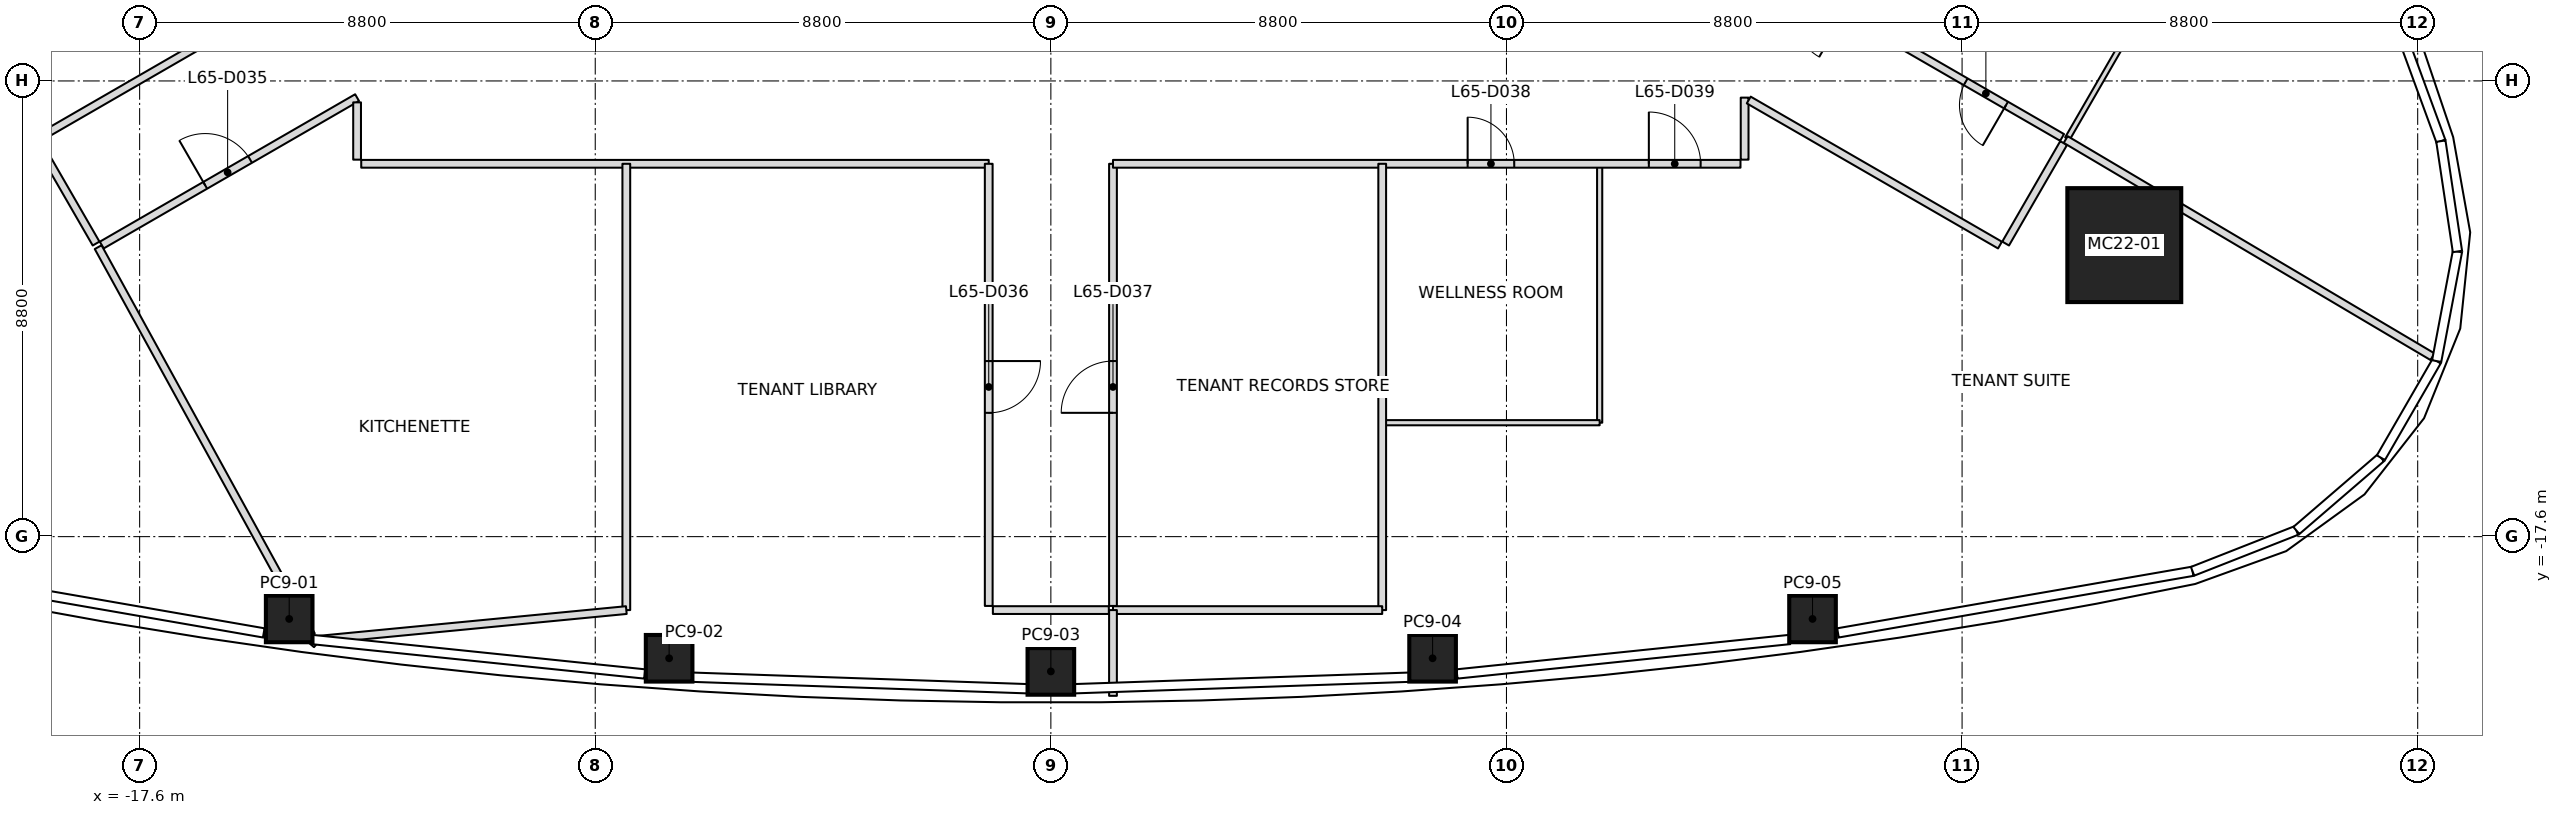
"""IFC4 building model, lengths in metres.
Left out: names, types, materials, properties, quantities, classifications, styles, units other than length and angle.
Written with IfcOpenShell. Run it as: python <this file> out.ifc"""

import sys

from ifc_helpers import new_model, si_unit, direction, frame, frame_2d, origin, origin_2d, place, context, subcontext, project, spatial, rectangle, extrude, element, fill, save


model = new_model("IFC4")
c1 = context("Model", 3, precision=1e-05, world=origin(), true_north=direction((0.0, 1.0)))
c2 = subcontext(c1, "Body", "Model", "MODEL_VIEW")
j1 = project(units=[si_unit("LENGTHUNIT", "METRE"), si_unit("PLANEANGLEUNIT", "RADIAN")], contexts=[c1])
p1 = place(None, origin())
s1 = spatial("IfcSite", under=j1, at=p1, CompositionType="ELEMENT")
p2 = place(p1, origin())
s2 = spatial("IfcBuilding", under=s1, at=p2, CompositionType="ELEMENT")
p3 = place(p2, frame((0.0, 0.0, 287.0)))
s3 = spatial("IfcBuildingStorey", under=s2, at=p3, CompositionType="ELEMENT", Elevation=287.0)
p4 = place(p3, frame((20.733, -11.97, 0.0), z_axis=(-0.027756747396, 0.015983006193, 0.999486921619), x_axis=(0.999614707262, 0.000443807261, 0.027753199115)))
e1 = element("IfcColumn", 1, at=p4, inside=s3, PredefinedType="COLUMN", context=c2, shape_type="SweptSolid", body=[
    extrude(rectangle(XDim=2.2, YDim=2.2, at=origin_2d()), origin(), (0.0, 0.0, 1.0), 4.002),
])
p5 = place(p3, frame((-14.711, -19.189, 0.0), z_axis=(0.017452456582, 0.010373837829, 0.999793876381), x_axis=(-0.990401248392, 0.137308803417, 0.015863785428)))
e2 = element("IfcColumn", 2, at=p5, inside=s3, PredefinedType="COLUMN", context=c2, shape_type="SweptSolid", body=[
    extrude(rectangle(XDim=0.9, YDim=0.9, at=origin_2d()), origin(), (0.0, 0.0, 1.0), 4.001),
])
p6 = place(p3, frame((-7.373, -19.949, 0.0), z_axis=(0.008727150594, 0.011168311599, 0.999899547784), x_axis=(-0.997597240476, 0.068823896137, 0.007938332055)))
e3 = element("IfcColumn", 3, at=p6, inside=s3, PredefinedType="COLUMN", context=c2, shape_type="SweptSolid", body=[
    extrude(rectangle(XDim=0.9, YDim=0.9, at=origin_2d()), origin(), (0.0, 0.0, 1.0), 4.0),
])
p7 = place(p3, frame((0.0, -20.203, 0.0), z_axis=(0.0, 0.011473854038, 0.99993417317), x_axis=(1.0, 0.0, 0.0)))
e4 = element("IfcColumn", 4, at=p7, inside=s3, PredefinedType="COLUMN", context=c2, shape_type="SweptSolid", body=[
    extrude(rectangle(XDim=0.9, YDim=0.9, at=origin_2d()), origin(), (0.0, 0.0, 1.0), 4.0),
])
p8 = place(p3, frame((7.373, -19.949, 0.0), z_axis=(-0.008727150594, 0.011168311599, 0.999899547784), x_axis=(0.997597240476, 0.068823896137, 0.007938332055)))
e5 = element("IfcColumn", 5, at=p8, inside=s3, PredefinedType="COLUMN", context=c2, shape_type="SweptSolid", body=[
    extrude(rectangle(XDim=0.9, YDim=0.9, at=origin_2d()), origin(), (0.0, 0.0, 1.0), 4.0),
])
p9 = place(p3, frame((14.711, -19.189, 0.0), z_axis=(-0.017452456582, 0.010373837829, 0.999793876381), x_axis=(0.990401248392, 0.137308803417, 0.015863785428)))
e6 = element("IfcColumn", 6, at=p9, inside=s3, PredefinedType="COLUMN", context=c2, shape_type="SweptSolid", body=[
    extrude(rectangle(XDim=0.9, YDim=0.9, at=origin_2d()), origin(), (0.0, 0.0, 1.0), 4.001),
])
p10 = place(p3, frame((-18.401, -12.01, 0.0), z_axis=(0.0, 0.0, 1.0), x_axis=(0.481538391905, -0.876424998002, 0.0)))
e7 = element("IfcWall", 7, at=p10, inside=s3, PredefinedType="PARTITIONING", context=c2, shape_type="SweptSolid", body=[
    extrude(rectangle(XDim=8.551, YDim=0.15, at=frame_2d((4.275, 0.0))), origin(), (0.0, 0.0, 1.0), 3.3),
])
p11 = place(p3, frame((-8.2, -10.4, 0.0), z_axis=(0.0, 0.0, 1.0), x_axis=(0.0, -1.0, 0.0)))
e8 = element("IfcWall", 8, at=p11, inside=s3, PredefinedType="PARTITIONING", context=c2, shape_type="SweptSolid", body=[
    extrude(rectangle(XDim=8.619, YDim=0.15, at=frame_2d((4.309, 0.0))), origin(), (0.0, 0.0, 1.0), 3.3),
])
p12 = place(p3, frame((-8.2, -19.019, 0.0), z_axis=(0.0, 0.0, 1.0), x_axis=(-0.995385286617, -0.09595900784, 0.0)))
e9 = element("IfcWall", 9, at=p12, inside=s3, PredefinedType="PARTITIONING", context=c2, shape_type="SweptSolid", body=[
    extrude(rectangle(XDim=5.961, YDim=0.15, at=frame_2d((2.98, 0.0))), origin(), (0.0, 0.0, 1.0), 3.234),
])
p13 = place(p3, frame((-14.184, -19.677, 0.0), z_axis=(0.0, 0.0, 1.0), x_axis=(-0.763090850206, 0.646291230276, 0.0)))
e10 = element("IfcWall", 10, at=p13, inside=s3, PredefinedType="PARTITIONING", context=c2, shape_type="SweptSolid", body=[
    extrude(rectangle(XDim=0.188, YDim=0.15, at=frame_2d((0.094, 0.0))), origin(), (0.0, 0.0, 1.0), 3.3),
])
p14 = place(p3, frame((6.4, -10.4, 0.0), z_axis=(0.0, 0.0, 1.0), x_axis=(0.0, -1.0, 0.0)))
e11 = element("IfcWall", 11, at=p14, inside=s3, PredefinedType="PARTITIONING", context=c2, shape_type="SweptSolid", body=[
    extrude(rectangle(XDim=8.619, YDim=0.15, at=frame_2d((4.309, 0.0))), origin(), (0.0, 0.0, 1.0), 3.3),
])
p15 = place(p3, frame((6.4, -19.019, 0.0), z_axis=(0.0, 0.0, 1.0), x_axis=(-1.0, 0.0, 0.0)))
e12 = element("IfcWall", 12, at=p15, inside=s3, PredefinedType="PARTITIONING", context=c2, shape_type="SweptSolid", body=[
    extrude(rectangle(XDim=5.2, YDim=0.15, at=frame_2d((2.6, 0.0))), origin(), (0.0, 0.0, 1.0), 3.3),
])
p16 = place(p3, frame((1.2, -19.019, 0.0), z_axis=(0.0, 0.0, 1.0), x_axis=(0.0, -1.0, 0.0)))
e13 = element("IfcWall", 13, at=p16, inside=s3, PredefinedType="PARTITIONING", context=c2, shape_type="SweptSolid", body=[
    extrude(rectangle(XDim=1.656, YDim=0.15, at=frame_2d((0.828, 0.0))), origin(), (0.0, 0.0, 1.0), 3.234),
])
p17 = place(p3, frame((19.601, -9.931, 0.0), z_axis=(0.0, 0.0, 1.0), x_axis=(0.860520712643, -0.509415452369, 0.0)))
e14 = element("IfcWall", 14, at=p17, inside=s3, PredefinedType="PARTITIONING", context=c2, shape_type="SweptSolid", body=[
    extrude(rectangle(XDim=8.234, YDim=0.15, at=frame_2d((4.117, 0.0))), origin(), (0.0, 0.0, 1.0), 3.084),
])
p18 = place(p3, frame((-19.561, -10.0, 0.0), z_axis=(0.0, 0.0, 1.0), x_axis=(0.500077830873, -0.865980463445, 0.0)))
e15 = element("IfcWall", 15, at=p18, inside=s3, PredefinedType="PARTITIONING", context=c2, shape_type="SweptSolid", body=[
    extrude(rectangle(XDim=2.24, YDim=0.15, at=frame_2d((1.12, 0.0))), origin(), (0.0, 0.0, 1.0), 3.233),
])
p19 = place(p3, frame((-13.4, -6.351, 0.0), z_axis=(0.0, 0.0, 1.0), x_axis=(-0.86602998301, -0.499992068465, 0.0)))
e16 = element("IfcWall", 16, at=p19, inside=s3, PredefinedType="PARTITIONING", context=c2, shape_type="SweptSolid", body=[
    extrude(rectangle(XDim=7.081, YDim=0.15, at=frame_2d((3.54, 0.0))), origin(), (0.0, 0.0, 1.0), 3.3),
])
p20 = place(p3, frame((-18.332, -11.969, 0.0), z_axis=(0.0, 0.0, 1.0), x_axis=(0.866026383709, 0.499998302717, 0.0)))
e17 = element("IfcWall", 17, at=p20, inside=s3, PredefinedType="PARTITIONING", context=c2, shape_type="SweptSolid", body=[
    extrude(rectangle(XDim=5.695, YDim=0.15, at=frame_2d((2.847, 0.0))), origin(), (0.0, 0.0, 1.0), 3.233),
])
p21 = place(p20, frame((2.308, 0.0, 0.0)))
e18 = element("IfcOpeningElement", 18, at=p21, cuts=e17, PredefinedType="OPENING", context=c2, shape_type="SweptSolid", body=[
    extrude(rectangle(XDim=1.0, YDim=2.1, at=frame_2d((0.5, 1.05))), frame((0.0, 0.075, 0.0), z_axis=(0.0, -1.0, 0.0), x_axis=(1.0, 0.0, 0.0)), (0.0, 0.0, 1.0), 0.15),
])
p22 = place(p3, frame((-13.4, -9.214, 0.0), z_axis=(0.0, 0.0, 1.0), x_axis=(0.0, -1.0, 0.0)))
e19 = element("IfcWall", 19, at=p22, inside=s3, PredefinedType="PARTITIONING", context=c2, shape_type="SweptSolid", body=[
    extrude(rectangle(XDim=1.106, YDim=0.15, at=frame_2d((0.553, 0.0))), origin(), (0.0, 0.0, 1.0), 3.233),
])
p23 = place(p3, frame((-13.32, -10.4, 0.0), z_axis=(0.0, 0.0, 1.0), x_axis=(1.0, 0.0, 0.0)))
e20 = element("IfcWall", 20, at=p23, inside=s3, PredefinedType="PARTITIONING", context=c2, shape_type="SweptSolid", body=[
    extrude(rectangle(XDim=12.12, YDim=0.15, at=frame_2d((6.06, 0.0))), origin(), (0.0, 0.0, 1.0), 3.3),
])
p24 = place(p3, frame((-1.2, -10.4, 0.0), z_axis=(0.0, 0.0, 1.0), x_axis=(0.0, -1.0, 0.0)))
e21 = element("IfcWall", 21, at=p24, inside=s3, PredefinedType="PARTITIONING", context=c2, shape_type="SweptSolid", body=[
    extrude(rectangle(XDim=8.539, YDim=0.15, at=frame_2d((4.269, 0.0))), origin(), (0.0, 0.0, 1.0), 3.3),
])
p25 = place(p24, frame((3.809, 0.0, 0.0)))
e22 = element("IfcOpeningElement", 22, at=p25, cuts=e21, PredefinedType="OPENING", context=c2, shape_type="SweptSolid", body=[
    extrude(rectangle(XDim=1.0, YDim=2.1, at=frame_2d((0.5, 1.05))), frame((0.0, 0.075, 0.0), z_axis=(0.0, -1.0, 0.0), x_axis=(1.0, 0.0, 0.0)), (0.0, 0.0, 1.0), 0.15),
])
p26 = place(p3, frame((-1.12, -19.019, 0.0), z_axis=(0.0, 0.0, 1.0), x_axis=(1.0, 0.0, 0.0)))
e23 = element("IfcWall", 23, at=p26, inside=s3, PredefinedType="PARTITIONING", context=c2, shape_type="SweptSolid", body=[
    extrude(rectangle(XDim=2.24, YDim=0.15, at=frame_2d((1.12, 0.0))), origin(), (0.0, 0.0, 1.0), 3.3),
])
p27 = place(p3, frame((1.2, -18.938, 0.0), z_axis=(0.0, 0.0, 1.0), x_axis=(0.0, 1.0, 0.0)))
e24 = element("IfcWall", 24, at=p27, inside=s3, PredefinedType="PARTITIONING", context=c2, shape_type="SweptSolid", body=[
    extrude(rectangle(XDim=8.539, YDim=0.15, at=frame_2d((4.269, 0.0))), origin(), (0.0, 0.0, 1.0), 3.3),
])
p28 = place(p27, frame((3.729, 0.0, 0.0)))
e25 = element("IfcOpeningElement", 25, at=p28, cuts=e24, PredefinedType="OPENING", context=c2, shape_type="SweptSolid", body=[
    extrude(rectangle(XDim=1.0, YDim=2.1, at=frame_2d((0.5, 1.05))), frame((0.0, 0.075, 0.0), z_axis=(0.0, -1.0, 0.0), x_axis=(1.0, 0.0, 0.0)), (0.0, 0.0, 1.0), 0.15),
])
p29 = place(p3, frame((1.2, -10.4, 0.0), z_axis=(0.0, 0.0, 1.0), x_axis=(1.0, 0.0, 0.0)))
e26 = element("IfcWall", 26, at=p29, inside=s3, PredefinedType="PARTITIONING", context=c2, shape_type="SweptSolid", body=[
    extrude(rectangle(XDim=12.12, YDim=0.15, at=frame_2d((6.06, 0.0))), origin(), (0.0, 0.0, 1.0), 3.3),
])
p30 = place(p29, frame((6.85, 0.0, 0.0)))
e27 = element("IfcOpeningElement", 27, at=p30, cuts=e26, PredefinedType="OPENING", context=c2, shape_type="SweptSolid", body=[
    extrude(rectangle(XDim=0.9, YDim=2.1, at=frame_2d((0.45, 1.05))), frame((0.0, 0.075, 0.0), z_axis=(0.0, -1.0, 0.0), x_axis=(1.0, 0.0, 0.0)), (0.0, 0.0, 1.0), 0.15),
])
p31 = place(p29, frame((10.35, 0.0, 0.0)))
e28 = element("IfcOpeningElement", 28, at=p31, cuts=e26, PredefinedType="OPENING", context=c2, shape_type="SweptSolid", body=[
    extrude(rectangle(XDim=1.0, YDim=2.1, at=frame_2d((0.5, 1.05))), frame((0.0, 0.075, 0.0), z_axis=(0.0, -1.0, 0.0), x_axis=(1.0, 0.0, 0.0)), (0.0, 0.0, 1.0), 0.15),
])
p32 = place(p3, frame((13.4, -10.32, 0.0), z_axis=(0.0, 0.0, 1.0), x_axis=(0.0, 1.0, 0.0)))
e29 = element("IfcWall", 29, at=p32, inside=s3, PredefinedType="PARTITIONING", context=c2, shape_type="SweptSolid", body=[
    extrude(rectangle(XDim=1.198, YDim=0.15, at=frame_2d((0.599, 0.0))), origin(), (0.0, 0.0, 1.0), 3.233),
])
p33 = place(p3, frame((13.479, -9.168, 0.0), z_axis=(0.0, 0.0, 1.0), x_axis=(0.866033213741, -0.499986472514, 0.0)))
e30 = element("IfcWall", 30, at=p33, inside=s3, PredefinedType="PARTITIONING", context=c2, shape_type="SweptSolid", body=[
    extrude(rectangle(XDim=5.603, YDim=0.15, at=frame_2d((2.802, 0.0))), origin(), (0.0, 0.0, 1.0), 3.233),
])
p34 = place(p3, frame((19.532, -9.891, 0.0), z_axis=(0.0, 0.0, 1.0), x_axis=(-0.86602998301, 0.499992068465, 0.0)))
e31 = element("IfcWall", 31, at=p34, inside=s3, PredefinedType="PARTITIONING", context=c2, shape_type="SweptSolid", body=[
    extrude(rectangle(XDim=7.081, YDim=0.15, at=frame_2d((3.54, 0.0))), origin(), (0.0, 0.0, 1.0), 3.167),
])
p35 = place(p34, frame((1.25, 0.0, 0.0)))
e32 = element("IfcOpeningElement", 32, at=p35, cuts=e31, PredefinedType="OPENING", context=c2, shape_type="SweptSolid", body=[
    extrude(rectangle(XDim=0.9, YDim=2.1, at=frame_2d((0.45, 1.05))), frame((0.0, 0.075, 0.0), z_axis=(0.0, -1.0, 0.0), x_axis=(1.0, 0.0, 0.0)), (0.0, 0.0, 1.0), 0.15),
])
p36 = place(p34, frame((4.84, 0.0, 0.0)))
e33 = element("IfcOpeningElement", 33, at=p36, cuts=e31, PredefinedType="OPENING", context=c2, shape_type="SweptSolid", body=[
    extrude(rectangle(XDim=1.0, YDim=2.1, at=frame_2d((0.5, 1.05))), frame((0.0, 0.075, 0.0), z_axis=(0.0, -1.0, 0.0), x_axis=(1.0, 0.0, 0.0)), (0.0, 0.0, 1.0), 0.15),
])
p37 = place(p3, frame((18.441, -11.94, 0.0), z_axis=(0.0, 0.0, 1.0), x_axis=(0.500077830873, 0.865980463445, 0.0)))
e34 = element("IfcWall", 34, at=p37, inside=s3, PredefinedType="PARTITIONING", context=c2, shape_type="SweptSolid", body=[
    extrude(rectangle(XDim=2.24, YDim=0.15, at=frame_2d((1.12, 0.0))), origin(), (0.0, 0.0, 1.0), 3.233),
])
p38 = place(p3, frame((10.6, -10.43, 0.0), z_axis=(0.0, 0.0, 1.0), x_axis=(0.0, -1.0, 0.0)))
e35 = element("IfcWall", 35, at=p38, inside=s3, PredefinedType="PARTITIONING", context=c2, shape_type="SweptSolid", body=[
    extrude(rectangle(XDim=4.97, YDim=0.1, at=frame_2d((2.485, 0.0))), origin(), (0.0, 0.0, 1.0), 3.3),
])
p39 = place(p3, frame((10.6, -15.4, 0.0), z_axis=(0.0, 0.0, 1.0), x_axis=(-1.0, 0.0, 0.0)))
e36 = element("IfcWall", 36, at=p39, inside=s3, PredefinedType="PARTITIONING", context=c2, shape_type="SweptSolid", body=[
    extrude(rectangle(XDim=4.17, YDim=0.1, at=frame_2d((2.085, 0.0))), origin(), (0.0, 0.0, 1.0), 3.3),
])
p40 = place(p3, frame((21.719, -6.304, 0.0), z_axis=(0.0, 0.0, 1.0), x_axis=(-0.499992746786, -0.866029591389, 0.0)))
e37 = element("IfcWall", 37, at=p40, inside=s3, PredefinedType="PARTITIONING", context=c2, shape_type="SweptSolid", body=[
    extrude(rectangle(XDim=4.17, YDim=0.1, at=frame_2d((2.085, 0.0))), origin(), (0.0, 0.0, 1.0), 3.3),
])
p41 = place(p21, origin())
e38 = element("IfcDoor", 38, at=p41, inside=s3, OperationType="SINGLE_SWING_LEFT", PredefinedType="DOOR", context=c2, shape_type="SweptSolid", body=[
    extrude(rectangle(XDim=1.0, YDim=2.1, at=frame_2d((0.5, 1.05))), frame((0.0, 0.025, 0.0), z_axis=(0.0, -1.0, 0.0), x_axis=(1.0, 0.0, 0.0)), (0.0, 0.0, 1.0), 0.05),
])
fill(e18, e38)
p42 = place(p25, origin())
e39 = element("IfcDoor", 39, at=p42, inside=s3, OperationType="SINGLE_SWING_RIGHT", PredefinedType="DOOR", context=c2, shape_type="SweptSolid", body=[
    extrude(rectangle(XDim=1.0, YDim=2.1, at=frame_2d((0.5, 1.05))), frame((0.0, 0.025, 0.0), z_axis=(0.0, -1.0, 0.0), x_axis=(1.0, 0.0, 0.0)), (0.0, 0.0, 1.0), 0.05),
])
fill(e22, e39)
p43 = place(p28, origin())
e40 = element("IfcDoor", 40, at=p43, inside=s3, OperationType="SINGLE_SWING_LEFT", PredefinedType="DOOR", context=c2, shape_type="SweptSolid", body=[
    extrude(rectangle(XDim=1.0, YDim=2.1, at=frame_2d((0.5, 1.05))), frame((0.0, 0.025, 0.0), z_axis=(0.0, -1.0, 0.0), x_axis=(1.0, 0.0, 0.0)), (0.0, 0.0, 1.0), 0.05),
])
fill(e25, e40)
p44 = place(p30, origin())
e41 = element("IfcDoor", 41, at=p44, inside=s3, OperationType="SINGLE_SWING_LEFT", PredefinedType="DOOR", context=c2, shape_type="SweptSolid", body=[
    extrude(rectangle(XDim=0.9, YDim=2.1, at=frame_2d((0.45, 1.05))), frame((0.0, 0.025, 0.0), z_axis=(0.0, -1.0, 0.0), x_axis=(1.0, 0.0, 0.0)), (0.0, 0.0, 1.0), 0.05),
])
fill(e27, e41)
p45 = place(p31, origin())
e42 = element("IfcDoor", 42, at=p45, inside=s3, OperationType="SINGLE_SWING_LEFT", PredefinedType="DOOR", context=c2, shape_type="SweptSolid", body=[
    extrude(rectangle(XDim=1.0, YDim=2.1, at=frame_2d((0.5, 1.05))), frame((0.0, 0.025, 0.0), z_axis=(0.0, -1.0, 0.0), x_axis=(1.0, 0.0, 0.0)), (0.0, 0.0, 1.0), 0.05),
])
fill(e28, e42)
p46 = place(p35, origin())
e43 = element("IfcDoor", 43, at=p46, inside=s3, OperationType="SINGLE_SWING_RIGHT", PredefinedType="DOOR", context=c2, shape_type="SweptSolid", body=[
    extrude(rectangle(XDim=0.9, YDim=2.1, at=frame_2d((0.45, 1.05))), frame((0.0, 0.025, 0.0), z_axis=(0.0, -1.0, 0.0), x_axis=(1.0, 0.0, 0.0)), (0.0, 0.0, 1.0), 0.05),
])
fill(e32, e43)
save(model, sys.argv[1])
